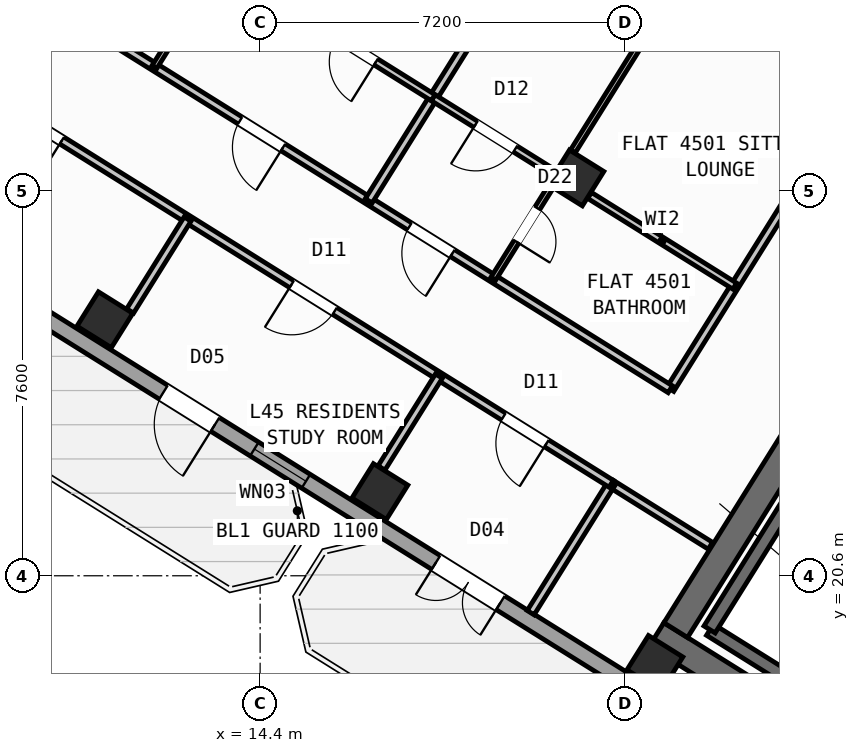
"""IFC4 building model, lengths in metres.
Left out: names, types, materials, properties, quantities, classifications, styles, units other than length and angle.
Written with IfcOpenShell. Run it as: python <this file> out.ifc"""

import sys

from ifc_helpers import new_model, si_unit, direction, frame, frame_2d, origin, origin_2d, place, context, subcontext, project, spatial, rectangle, hollow_rectangle, extrude, source, transform, mapped, element, fill, save


model = new_model("IFC4")
c1 = context("Model", 3, precision=1e-05, world=origin(), true_north=direction((0.0, 1.0)))
c2 = subcontext(c1, "Body", "Model", "MODEL_VIEW")
j1 = project(units=[si_unit("LENGTHUNIT", "METRE"), si_unit("PLANEANGLEUNIT", "RADIAN")], contexts=[c1])
p1 = place(None, origin())
s1 = spatial("IfcSite", under=j1, at=p1, CompositionType="ELEMENT")
p2 = place(p1, origin())
s2 = spatial("IfcBuilding", under=s1, at=p2, CompositionType="ELEMENT")
p3 = place(p2, frame((0.0, 0.0, 179.4)))
s3 = spatial("IfcBuildingStorey", under=s2, at=p3, CompositionType="ELEMENT", Elevation=179.4)
p4 = place(p3, frame((33.366, 12.477, 0.0), z_axis=(0.0, 0.0, 1.0), x_axis=(-0.848047359947, 0.529920442413, 0.0)))
e1 = element("IfcWall", 1, at=p4, inside=s3, PredefinedType="SHEAR", context=c2, shape_type="SweptSolid", body=[
    extrude(rectangle(XDim=13.14, YDim=0.55, at=frame_2d((6.57, 0.0))), origin(), (0.0, 0.0, 1.0), 4.55),
])
p5 = place(p3, frame((26.007, 24.976, 0.0), z_axis=(0.0, 0.0, 1.0), x_axis=(-0.529923795287, -0.848045264823, 0.0)))
e2 = element("IfcWall", 2, at=p5, inside=s3, PredefinedType="SHEAR", context=c2, shape_type="SweptSolid", body=[
    extrude(rectangle(XDim=6.425, YDim=0.55, at=frame_2d((3.212, 0.0))), origin(), (0.0, 0.0, 1.0), 4.55),
])
m1 = source(origin(), c2, "Body", "SweptSolid", [
    extrude(hollow_rectangle(XDim=0.8, YDim=0.8, WallThickness=0.032, at=origin_2d()), origin(), (0.0, 0.0, 1.0), 4.8),
])
for number, where, z_axis, x_axis in (
    (3, (22.191, 18.87, 0.0), (0.0, 0.0, 1.0), (-0.848, 0.53, 0.0)),
    (4, (20.632, 28.452, 0.0), (0.0, 0.0, 1.0), (-0.848, 0.53, 0.0)),
    (5, (16.764, 22.261, 0.0), (0.0, 0.0, 1.0), (-0.848, 0.53, 0.0)),
    (6, (11.336, 25.653, 0.0), (0.0, 0.0, 1.0), (-0.848, 0.53, 0.0)),
):
    element("IfcColumn", number, at=place(p3, frame(where, z_axis=z_axis, x_axis=x_axis)), inside=s3, PredefinedType="COLUMN", context=c2, shape_type="MappedRepresentation", body=[
        mapped(m1, transform((0.0, 0.0, 0.0), scale=1.0)),
    ])
p6 = place(p3, frame((31.76, 12.183, 0.0), z_axis=(0.0, 0.0, 1.0), x_axis=(-0.848047074256, 0.529920899612, 0.0)))
e7 = element("IfcWall", 7, at=p6, inside=s3, PredefinedType="STANDARD", context=c2, shape_type="SweptSolid", body=[
    extrude(rectangle(XDim=30.652, YDim=0.32, at=frame_2d((15.326, 0.0))), origin(), (0.0, 0.0, 1.0), 4.55),
])
p7 = place(p6, frame((21.52, 0.0, 0.0)))
e8 = element("IfcOpeningElement", 8, at=p7, cuts=e7, PredefinedType="OPENING", context=c2, shape_type="SweptSolid", body=[
    extrude(rectangle(XDim=1.2, YDim=2.15, at=frame_2d((0.6, 1.075))), frame((0.0, 0.17, 0.0), z_axis=(0.0, -1.0, 0.0), x_axis=(1.0, 0.0, 0.0)), (0.0, 0.0, 1.0), 0.34),
])
p8 = place(p6, frame((14.878, 0.0, 0.0)))
e9 = element("IfcOpeningElement", 9, at=p8, cuts=e7, PredefinedType="OPENING", context=c2, shape_type="SweptSolid", body=[
    extrude(rectangle(XDim=1.5, YDim=2.25, at=frame_2d((0.75, 1.125))), frame((0.0, 0.17, 0.0), z_axis=(0.0, -1.0, 0.0), x_axis=(1.0, 0.0, 0.0)), (0.0, 0.0, 1.0), 0.34),
])
p9 = place(p6, frame((1.865, 0.0, 0.75)))
e10 = element("IfcOpeningElement", 10, at=p9, cuts=e7, PredefinedType="OPENING", context=c2, shape_type="SweptSolid", body=[
    extrude(rectangle(XDim=2.4, YDim=1.6, at=frame_2d((1.2, 0.8))), frame((0.0, 0.17, 0.0), z_axis=(0.0, -1.0, 0.0), x_axis=(1.0, 0.0, 0.0)), (0.0, 0.0, 1.0), 0.34),
])
p10 = place(p6, frame((7.094, 0.0, 0.75)))
e11 = element("IfcOpeningElement", 11, at=p10, cuts=e7, PredefinedType="OPENING", context=c2, shape_type="SweptSolid", body=[
    extrude(rectangle(XDim=2.4, YDim=1.6, at=frame_2d((1.2, 0.8))), frame((0.0, 0.17, 0.0), z_axis=(0.0, -1.0, 0.0), x_axis=(1.0, 0.0, 0.0)), (0.0, 0.0, 1.0), 0.34),
])
p11 = place(p6, frame((19.404, 0.0, 0.95)))
e12 = element("IfcOpeningElement", 12, at=p11, cuts=e7, PredefinedType="OPENING", context=c2, shape_type="SweptSolid", body=[
    extrude(rectangle(XDim=1.2, YDim=1.4, at=frame_2d((0.6, 0.7))), frame((0.0, 0.17, 0.0), z_axis=(0.0, -1.0, 0.0), x_axis=(1.0, 0.0, 0.0)), (0.0, 0.0, 1.0), 0.34),
])
p12 = place(p6, frame((26.458, 0.0, 0.75)))
e13 = element("IfcOpeningElement", 13, at=p12, cuts=e7, PredefinedType="OPENING", context=c2, shape_type="SweptSolid", body=[
    extrude(rectangle(XDim=2.4, YDim=1.6, at=frame_2d((1.2, 0.8))), frame((0.0, 0.17, 0.0), z_axis=(0.0, -1.0, 0.0), x_axis=(1.0, 0.0, 0.0)), (0.0, 0.0, 1.0), 0.34),
])
p13 = place(p3, frame((5.7, 28.71, 0.0), z_axis=(0.0, 0.0, 1.0), x_axis=(0.529923711467, 0.8480453172, 0.0)))
e14 = element("IfcWall", 14, at=p13, inside=s3, PredefinedType="STANDARD", context=c2, shape_type="SweptSolid", body=[
    extrude(rectangle(XDim=21.587, YDim=0.32, at=frame_2d((10.794, 0.0))), origin(), (0.0, 0.0, 1.0), 4.025),
])
p14 = place(p13, frame((10.127, 0.0, 0.75)))
e15 = element("IfcOpeningElement", 15, at=p14, cuts=e14, PredefinedType="OPENING", context=c2, shape_type="SweptSolid", body=[
    extrude(rectangle(XDim=2.4, YDim=1.6, at=frame_2d((1.2, 0.8))), frame((0.0, 0.17, 0.0), z_axis=(0.0, -1.0, 0.0), x_axis=(1.0, 0.0, 0.0)), (0.0, 0.0, 1.0), 0.34),
])
p15 = place(p3, frame((29.605, 15.581, 0.0), z_axis=(0.0, 0.0, 1.0), x_axis=(-0.848036911448, 0.529937163087, 0.0)))
e16 = element("IfcWall", 16, at=p15, inside=s3, PredefinedType="SHEAR", context=c2, shape_type="SweptSolid", body=[
    extrude(rectangle(XDim=7.46, YDim=0.26, at=frame_2d((3.73, 0.0))), origin(), (0.0, 0.0, 1.0), 4.55),
])
p16 = place(p3, frame((24.945, 22.22, 0.0), z_axis=(0.0, 0.0, 1.0), x_axis=(-0.529908658664, -0.84805472316, 0.0)))
e17 = element("IfcWall", 17, at=p16, inside=s3, PredefinedType="SHEAR", context=c2, shape_type="SweptSolid", body=[
    extrude(rectangle(XDim=3.16, YDim=0.26, at=frame_2d((1.58, 0.0))), origin(), (0.0, 0.0, 1.0), 4.55),
])
p17 = place(p3, frame((23.286, 21.192, 0.0), z_axis=(0.0, 0.0, 1.0), x_axis=(-0.848028015797, 0.529951398172, 0.0)))
e18 = element("IfcWall", 18, at=p17, inside=s3, PredefinedType="PARTITIONING", context=c2, shape_type="SweptSolid", body=[
    extrude(rectangle(XDim=2.308, YDim=0.16, at=frame_2d((1.154, 0.0))), origin(), (0.0, 0.0, 1.0), 4.54),
])
p18 = place(p3, frame((31.239, 38.274, 0.0), z_axis=(0.0, 0.0, 1.0), x_axis=(-0.529921796515, -0.848046513806, 0.0)))
e19 = element("IfcWall", 19, at=p18, inside=s3, PredefinedType="PARTITIONING", context=c2, shape_type="SweptSolid", body=[
    extrude(rectangle(XDim=16.5, YDim=0.16, at=frame_2d((8.25, 0.0))), origin(), (0.0, 0.0, 1.0), 4.54),
])
p19 = place(p3, frame((21.329, 22.416, 0.0), z_axis=(0.0, 0.0, 1.0), x_axis=(-0.529933104572, -0.848039447596, 0.0)))
e20 = element("IfcWall", 20, at=p19, inside=s3, PredefinedType="PARTITIONING", context=c2, shape_type="SweptSolid", body=[
    extrude(rectangle(XDim=3.0, YDim=0.16, at=frame_2d((1.5, 0.0))), origin(), (0.0, 0.0, 1.0), 4.54),
])
p20 = place(p3, frame((22.495, 24.281, 0.0), z_axis=(0.0, 0.0, 1.0), x_axis=(-0.848052408131, 0.529912363569, 0.0)))
e21 = element("IfcWall", 21, at=p20, inside=s3, PredefinedType="PARTITIONING", context=c2, shape_type="SweptSolid", body=[
    extrude(rectangle(XDim=16.73, YDim=0.16, at=frame_2d((8.365, 0.0))), origin(), (0.0, 0.0, 1.0), 4.54),
])
p21 = place(p20, frame((5.068, 0.0, 0.0)))
e22 = element("IfcOpeningElement", 22, at=p21, cuts=e21, PredefinedType="OPENING", context=c2, shape_type="SweptSolid", body=[
    extrude(rectangle(XDim=1.0, YDim=2.1, at=frame_2d((0.5, 1.05))), frame((0.0, 0.09, 0.0), z_axis=(0.0, -1.0, 0.0), x_axis=(1.0, 0.0, 0.0)), (0.0, 0.0, 1.0), 0.18),
])
p22 = place(p20, frame((9.011, 0.0, 0.0)))
e23 = element("IfcOpeningElement", 23, at=p22, cuts=e21, PredefinedType="OPENING", context=c2, shape_type="SweptSolid", body=[
    extrude(rectangle(XDim=1.0, YDim=2.1, at=frame_2d((0.5, 1.05))), frame((0.0, 0.09, 0.0), z_axis=(0.0, -1.0, 0.0), x_axis=(1.0, 0.0, 0.0)), (0.0, 0.0, 1.0), 0.18),
])
p23 = place(p3, frame((21.329, 22.416, 0.0), z_axis=(0.0, 0.0, 1.0), x_axis=(-0.848052408131, 0.529912363569, 0.0)))
e24 = element("IfcWall", 24, at=p23, inside=s3, PredefinedType="PARTITIONING", context=c2, shape_type="SweptSolid", body=[
    extrude(rectangle(XDim=16.73, YDim=0.16, at=frame_2d((8.365, 0.0))), origin(), (0.0, 0.0, 1.0), 4.54),
])
p24 = place(p23, frame((1.505, 0.0, 0.0)))
e25 = element("IfcOpeningElement", 25, at=p24, cuts=e24, PredefinedType="OPENING", context=c2, shape_type="SweptSolid", body=[
    extrude(rectangle(XDim=1.0, YDim=2.1, at=frame_2d((0.5, 1.05))), frame((0.0, 0.09, 0.0), z_axis=(0.0, -1.0, 0.0), x_axis=(1.0, 0.0, 0.0)), (0.0, 0.0, 1.0), 0.18),
])
p25 = place(p23, frame((6.435, 0.0, 0.0)))
e26 = element("IfcOpeningElement", 26, at=p25, cuts=e24, PredefinedType="OPENING", context=c2, shape_type="SweptSolid", body=[
    extrude(rectangle(XDim=1.0, YDim=2.1, at=frame_2d((0.5, 1.05))), frame((0.0, 0.09, 0.0), z_axis=(0.0, -1.0, 0.0), x_axis=(1.0, 0.0, 0.0)), (0.0, 0.0, 1.0), 0.18),
])
p26 = place(p23, frame((12.784, 0.0, 0.0)))
e27 = element("IfcOpeningElement", 27, at=p26, cuts=e24, PredefinedType="OPENING", context=c2, shape_type="SweptSolid", body=[
    extrude(rectangle(XDim=1.0, YDim=2.1, at=frame_2d((0.5, 1.05))), frame((0.0, 0.09, 0.0), z_axis=(0.0, -1.0, 0.0), x_axis=(1.0, 0.0, 0.0)), (0.0, 0.0, 1.0), 0.18),
])
p27 = place(p3, frame((17.928, 24.541, 0.0), z_axis=(0.0, 0.0, 1.0), x_axis=(-0.529844966244, -0.848094518167, 0.0)))
e28 = element("IfcWall", 28, at=p27, inside=s3, PredefinedType="PARTITIONING", context=c2, shape_type="SweptSolid", body=[
    extrude(rectangle(XDim=2.138, YDim=0.16, at=frame_2d((1.069, 0.0))), origin(), (0.0, 0.0, 1.0), 4.025),
])
p28 = place(p3, frame((12.968, 27.64, 0.0), z_axis=(0.0, 0.0, 1.0), x_axis=(-0.52989628283, -0.848062456098, 0.0)))
e29 = element("IfcWall", 29, at=p28, inside=s3, PredefinedType="PARTITIONING", context=c2, shape_type="SweptSolid", body=[
    extrude(rectangle(XDim=2.138, YDim=0.16, at=frame_2d((1.069, 0.0))), origin(), (0.0, 0.0, 1.0), 4.54),
])
p29 = place(p3, frame((25.351, 42.095, 0.0), z_axis=(0.0, 0.0, 1.0), x_axis=(-0.529926315456, -0.848043690023, 0.0)))
e30 = element("IfcWall", 30, at=p29, inside=s3, PredefinedType="PARTITIONING", context=c2, shape_type="SweptSolid", body=[
    extrude(rectangle(XDim=16.62, YDim=0.16, at=frame_2d((8.31, 0.0))), origin(), (0.0, 0.0, 1.0), 4.54),
])
p30 = place(p3, frame((24.004, 34.467, 0.0), z_axis=(0.0, 0.0, 1.0), x_axis=(-0.529907440938, -0.848055484057, 0.0)))
e31 = element("IfcWall", 31, at=p30, inside=s3, PredefinedType="PARTITIONING", context=c2, shape_type="SweptSolid", body=[
    extrude(rectangle(XDim=6.476, YDim=0.11, at=frame_2d((3.238, 0.0))), origin(), (0.0, 0.0, 1.0), 4.54),
])
p31 = place(p30, frame((2.552, 0.0, 0.0)))
e32 = element("IfcOpeningElement", 32, at=p31, cuts=e31, PredefinedType="OPENING", context=c2, shape_type="SweptSolid", body=[
    extrude(rectangle(XDim=0.92, YDim=2.08, at=frame_2d((0.46, 1.04))), frame((0.0, 0.065, 0.0), z_axis=(0.0, -1.0, 0.0), x_axis=(1.0, 0.0, 0.0)), (0.0, 0.0, 1.0), 0.13),
])
p32 = place(p3, frame((20.135, 28.277, 0.0), z_axis=(0.0, 0.0, 1.0), x_axis=(-0.529844966244, -0.848094518167, 0.0)))
e33 = element("IfcWall", 33, at=p32, inside=s3, PredefinedType="PARTITIONING", context=c2, shape_type="SweptSolid", body=[
    extrude(rectangle(XDim=2.138, YDim=0.11, at=frame_2d((1.069, 0.0))), origin(), (0.0, 0.0, 1.0), 4.54),
])
p33 = place(p32, frame((0.498, 0.0, 0.0)))
e34 = element("IfcOpeningElement", 34, at=p33, cuts=e33, PredefinedType="OPENING", context=c2, shape_type="SweptSolid", body=[
    extrude(rectangle(XDim=0.78, YDim=2.05, at=frame_2d((0.39, 1.025))), frame((0.0, 0.065, 0.0), z_axis=(0.0, -1.0, 0.0), x_axis=(1.0, 0.0, 0.0)), (0.0, 0.0, 1.0), 0.13),
])
p34 = place(p3, frame((20.203, 28.543, 0.0), z_axis=(0.0, 0.0, 1.0), x_axis=(-0.848066485351, 0.529889834233, 0.0)))
e35 = element("IfcWall", 35, at=p34, inside=s3, PredefinedType="PLUMBINGWALL", context=c2, shape_type="SweptSolid", body=[
    extrude(rectangle(XDim=2.816, YDim=0.14, at=frame_2d((1.408, 0.0))), origin(), (0.0, 0.0, 1.0), 4.025),
])
p35 = place(p34, frame((0.906, 0.0, 0.0)))
e36 = element("IfcOpeningElement", 36, at=p35, cuts=e35, PredefinedType="OPENING", context=c2, shape_type="SweptSolid", body=[
    extrude(rectangle(XDim=0.92, YDim=2.08, at=frame_2d((0.46, 1.04))), frame((0.0, 0.08, 0.0), z_axis=(0.0, -1.0, 0.0), x_axis=(1.0, 0.0, 0.0)), (0.0, 0.0, 1.0), 0.16),
])
p36 = place(p3, frame((23.767, 26.316, 0.0), z_axis=(0.0, 0.0, 1.0), x_axis=(-0.848055143312, 0.529907986259, 0.0)))
e37 = element("IfcWall", 37, at=p36, inside=s3, PredefinedType="PLUMBINGWALL", context=c2, shape_type="SweptSolid", body=[
    extrude(rectangle(XDim=3.378, YDim=0.14, at=frame_2d((1.689, 0.0))), origin(), (0.0, 0.0, 1.0), 4.025),
])
p37 = place(p3, frame((21.202, 44.864, 0.0), z_axis=(0.0, 0.0, 1.0), x_axis=(-0.529920421309, -0.848047373134, 0.0)))
e38 = element("IfcWall", 38, at=p37, inside=s3, PredefinedType="PARTITIONING", context=c2, shape_type="SweptSolid", body=[
    extrude(rectangle(XDim=16.77, YDim=0.11, at=frame_2d((8.385, 0.0))), origin(), (0.0, 0.0, 1.0), 4.54),
])
p38 = place(p37, frame((15.13, 0.0, 0.0)))
e39 = element("IfcOpeningElement", 39, at=p38, cuts=e38, PredefinedType="OPENING", context=c2, shape_type="SweptSolid", body=[
    extrude(rectangle(XDim=0.78, YDim=2.05, at=frame_2d((0.39, 1.025))), frame((0.0, 0.065, 0.0), z_axis=(0.0, -1.0, 0.0), x_axis=(1.0, 0.0, 0.0)), (0.0, 0.0, 1.0), 0.13),
])
p39 = place(p37, frame((9.884, 0.0, 0.0)))
e40 = element("IfcOpeningElement", 40, at=p39, cuts=e38, PredefinedType="OPENING", context=c2, shape_type="SweptSolid", body=[
    extrude(rectangle(XDim=0.92, YDim=2.08, at=frame_2d((0.46, 1.04))), frame((0.0, 0.065, 0.0), z_axis=(0.0, -1.0, 0.0), x_axis=(1.0, 0.0, 0.0)), (0.0, 0.0, 1.0), 0.13),
])
p40 = place(p3, frame((17.815, 30.035, 0.0), z_axis=(0.0, 0.0, 1.0), x_axis=(-0.848033088468, 0.529943280798, 0.0)))
e41 = element("IfcWall", 41, at=p40, inside=s3, PredefinedType="PLUMBINGWALL", context=c2, shape_type="SweptSolid", body=[
    extrude(rectangle(XDim=2.76, YDim=0.14, at=frame_2d((1.38, 0.0))), origin(), (0.0, 0.0, 1.0), 4.025),
])
p41 = place(p40, frame((1.333, 0.0, 0.0)))
e42 = element("IfcOpeningElement", 42, at=p41, cuts=e41, PredefinedType="OPENING", context=c2, shape_type="SweptSolid", body=[
    extrude(rectangle(XDim=0.92, YDim=2.08, at=frame_2d((0.46, 1.04))), frame((0.0, 0.08, 0.0), z_axis=(0.0, -1.0, 0.0), x_axis=(1.0, 0.0, 0.0)), (0.0, 0.0, 1.0), 0.16),
])
m2 = source(origin(), c2, "Body", "SweptSolid", [
    extrude(rectangle(XDim=1.2, YDim=2.15, at=frame_2d((0.6, 1.075))), frame((0.0, 0.025, 0.0), z_axis=(0.0, -1.0, 0.0), x_axis=(1.0, 0.0, 0.0)), (0.0, 0.0, 1.0), 0.05),
])
p42 = place(p7, origin())
e43 = element("IfcDoor", 43, at=p42, inside=s3, OperationType="SINGLE_SWING_LEFT", PredefinedType="DOOR", context=c2, shape_type="MappedRepresentation", body=[
    mapped(m2, transform((0.0, 0.0, 0.0), scale=1.0)),
])
fill(e8, e43)
m3 = source(origin(), c2, "Body", "SweptSolid", [
    extrude(rectangle(XDim=1.5, YDim=2.25, at=frame_2d((0.75, 1.125))), frame((0.0, 0.025, 0.0), z_axis=(0.0, -1.0, 0.0), x_axis=(1.0, 0.0, 0.0)), (0.0, 0.0, 1.0), 0.05),
])
p43 = place(p8, origin())
e44 = element("IfcDoor", 44, at=p43, inside=s3, OperationType="DOUBLE_DOOR_SINGLE_SWING", PredefinedType="DOOR", context=c2, shape_type="MappedRepresentation", body=[
    mapped(m3, transform((0.0, 0.0, 0.0), scale=1.0)),
])
fill(e9, e44)
m4 = source(origin(), c2, "Body", "SweptSolid", [
    extrude(rectangle(XDim=1.2, YDim=1.4, at=frame_2d((0.6, 0.7))), frame((0.0, 0.03, 0.0), z_axis=(0.0, -1.0, 0.0), x_axis=(1.0, 0.0, 0.0)), (0.0, 0.0, 1.0), 0.06),
])
p44 = place(p11, origin())
e45 = element("IfcWindow", 45, at=p44, inside=s3, PartitioningType="SINGLE_PANEL", PredefinedType="WINDOW", context=c2, shape_type="MappedRepresentation", body=[
    mapped(m4, transform((0.0, 0.0, 0.0), scale=1.0)),
])
fill(e12, e45)
m5 = source(origin(), c2, "Body", "SweptSolid", [
    extrude(rectangle(XDim=1.0, YDim=2.1, at=frame_2d((0.5, 1.05))), frame((0.0, 0.025, 0.0), z_axis=(0.0, -1.0, 0.0), x_axis=(1.0, 0.0, 0.0)), (0.0, 0.0, 1.0), 0.05),
])
p45 = place(p24, origin())
e46 = element("IfcDoor", 46, at=p45, inside=s3, OperationType="SINGLE_SWING_LEFT", PredefinedType="DOOR", context=c2, shape_type="MappedRepresentation", body=[
    mapped(m5, transform((0.0, 0.0, 0.0), scale=1.0)),
])
fill(e25, e46)
p46 = place(p25, origin())
e47 = element("IfcDoor", 47, at=p46, inside=s3, OperationType="SINGLE_SWING_RIGHT", PredefinedType="DOOR", context=c2, shape_type="MappedRepresentation", body=[
    mapped(m5, transform((0.0, 0.0, 0.0), scale=1.0)),
])
fill(e26, e47)
p47 = place(p26, origin())
e48 = element("IfcDoor", 48, at=p47, inside=s3, OperationType="SINGLE_SWING_LEFT", PredefinedType="DOOR", context=c2, shape_type="MappedRepresentation", body=[
    mapped(m5, transform((0.0, 0.0, 0.0), scale=1.0)),
])
fill(e27, e48)
p48 = place(p21, origin())
e49 = element("IfcDoor", 49, at=p48, inside=s3, OperationType="SINGLE_SWING_LEFT", PredefinedType="DOOR", context=c2, shape_type="MappedRepresentation", body=[
    mapped(m5, transform((0.0, 0.0, 0.0), scale=1.0)),
])
fill(e22, e49)
m6 = source(origin(), c2, "Body", "SweptSolid", [
    extrude(rectangle(XDim=0.92, YDim=2.08, at=frame_2d((0.46, 1.04))), frame((0.0, 0.025, 0.0), z_axis=(0.0, -1.0, 0.0), x_axis=(1.0, 0.0, 0.0)), (0.0, 0.0, 1.0), 0.05),
])
p49 = place(p35, origin())
e50 = element("IfcDoor", 50, at=p49, inside=s3, OperationType="SINGLE_SWING_RIGHT", PredefinedType="DOOR", context=c2, shape_type="MappedRepresentation", body=[
    mapped(m6, transform((0.0, 0.0, 0.0), scale=1.0)),
])
fill(e36, e50)
m7 = source(origin(), c2, "Body", "SweptSolid", [
    extrude(rectangle(XDim=0.78, YDim=2.05, at=frame_2d((0.39, 1.025))), frame((0.0, 0.025, 0.0), z_axis=(0.0, -1.0, 0.0), x_axis=(1.0, 0.0, 0.0)), (0.0, 0.0, 1.0), 0.05),
])
p50 = place(p33, origin())
e51 = element("IfcDoor", 51, at=p50, inside=s3, OperationType="SINGLE_SWING_RIGHT", PredefinedType="DOOR", context=c2, shape_type="MappedRepresentation", body=[
    mapped(m7, transform((0.0, 0.0, 0.0), scale=1.0)),
])
fill(e34, e51)
p51 = place(p22, origin())
e52 = element("IfcDoor", 52, at=p51, inside=s3, OperationType="SINGLE_SWING_LEFT", PredefinedType="DOOR", context=c2, shape_type="MappedRepresentation", body=[
    mapped(m5, transform((0.0, 0.0, 0.0), scale=1.0)),
])
fill(e23, e52)
p52 = place(p41, origin())
e53 = element("IfcDoor", 53, at=p52, inside=s3, OperationType="SINGLE_SWING_LEFT", PredefinedType="DOOR", context=c2, shape_type="MappedRepresentation", body=[
    mapped(m6, transform((0.0, 0.0, 0.0), scale=1.0)),
])
fill(e42, e53)
save(model, sys.argv[1])
